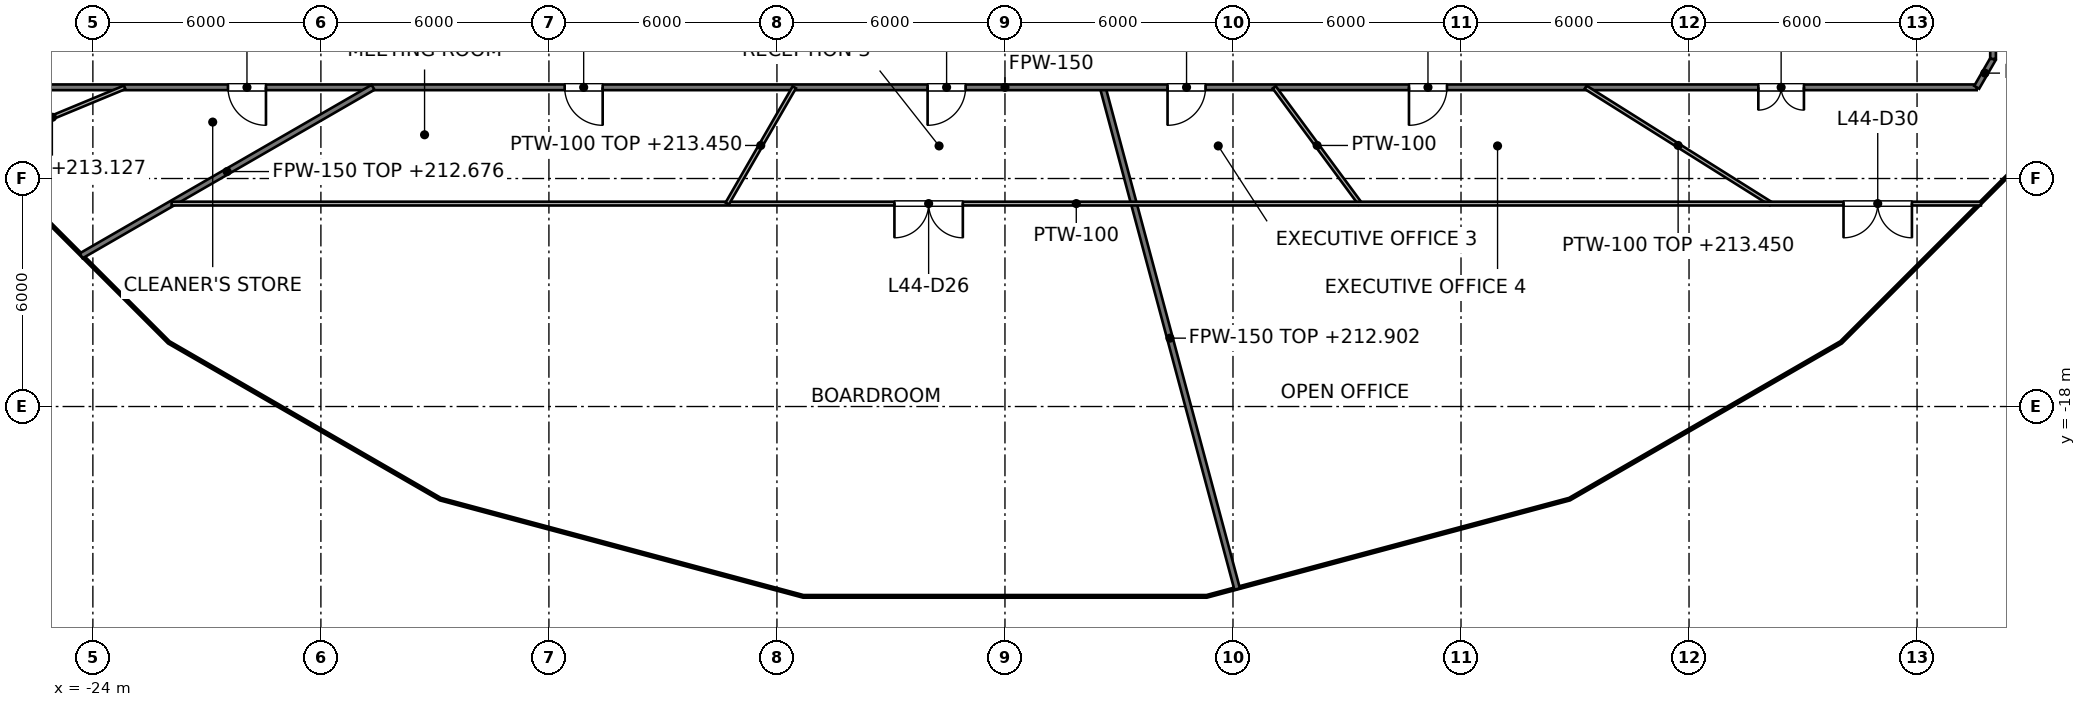
"""IFC4 building model, lengths in metres.
Left out: names, types, materials, properties, quantities, classifications, styles, units other than length and angle.
Written with IfcOpenShell. Run it as: python <this file> out.ifc"""

import sys

from ifc_helpers import new_model, si_unit, direction, frame, frame_2d, origin, place, context, subcontext, project, spatial, rectangle, extrude, element, fill, save


model = new_model("IFC4")
c1 = context("Model", 3, precision=1e-05, world=origin(), true_north=direction((0.0, 1.0)))
c2 = subcontext(c1, "Body", "Model", "MODEL_VIEW")
j1 = project(units=[si_unit("LENGTHUNIT", "METRE"), si_unit("PLANEANGLEUNIT", "RADIAN")], contexts=[c1])
p1 = place(None, origin())
s1 = spatial("IfcSite", under=j1, at=p1, CompositionType="ELEMENT")
p2 = place(p1, origin())
s2 = spatial("IfcBuilding", under=s1, at=p2, CompositionType="ELEMENT")
p3 = place(p2, frame((0.0, 0.0, 209.6)))
s3 = spatial("IfcBuildingStorey", under=s2, at=p3, CompositionType="ELEMENT", Elevation=209.6)
p4 = place(p3, frame((2.572, -9.6, 0.0), z_axis=(0.0, 0.0, 1.0), x_axis=(0.258846500895, -0.965918469113, 0.0)))
e1 = element("IfcWall", 1, at=p4, inside=s3, PredefinedType="PARTITIONING", context=c2, shape_type="SweptSolid", body=[
    extrude(rectangle(XDim=13.668, YDim=0.15, at=frame_2d((6.834, 0.0))), origin(), (0.0, 0.0, 1.0), 3.302),
])
p5 = place(p3, frame((-25.569, -9.6, 0.0), z_axis=(0.0, 0.0, 1.0), x_axis=(1.0, 0.0, 0.0)))
e2 = element("IfcWall", 2, at=p5, inside=s3, PredefinedType="PARTITIONING", context=c2, shape_type="SweptSolid", body=[
    extrude(rectangle(XDim=51.138, YDim=0.15, at=frame_2d((25.569, 0.0))), origin(), (0.0, 0.0, 1.0), 2.918),
])
p6 = place(p5, frame((5.124, 0.0, 0.0)))
e3 = element("IfcOpeningElement", 3, at=p6, cuts=e2, PredefinedType="OPENING", context=c2, shape_type="SweptSolid", body=[
    extrude(rectangle(XDim=1.0, YDim=2.1, at=frame_2d((0.5, 1.05))), frame((0.0, 0.075, 0.0), z_axis=(0.0, -1.0, 0.0), x_axis=(1.0, 0.0, 0.0)), (0.0, 0.0, 1.0), 0.15),
])
p7 = place(p5, frame((13.983, 0.0, 0.0)))
e4 = element("IfcOpeningElement", 4, at=p7, cuts=e2, PredefinedType="OPENING", context=c2, shape_type="SweptSolid", body=[
    extrude(rectangle(XDim=1.0, YDim=2.1, at=frame_2d((0.5, 1.05))), frame((0.0, 0.075, 0.0), z_axis=(0.0, -1.0, 0.0), x_axis=(1.0, 0.0, 0.0)), (0.0, 0.0, 1.0), 0.15),
])
p8 = place(p5, frame((23.533, 0.0, 0.0)))
e5 = element("IfcOpeningElement", 5, at=p8, cuts=e2, PredefinedType="OPENING", context=c2, shape_type="SweptSolid", body=[
    extrude(rectangle(XDim=1.0, YDim=2.1, at=frame_2d((0.5, 1.05))), frame((0.0, 0.075, 0.0), z_axis=(0.0, -1.0, 0.0), x_axis=(1.0, 0.0, 0.0)), (0.0, 0.0, 1.0), 0.15),
])
p9 = place(p5, frame((29.847, 0.0, 0.0)))
e6 = element("IfcOpeningElement", 6, at=p9, cuts=e2, PredefinedType="OPENING", context=c2, shape_type="SweptSolid", body=[
    extrude(rectangle(XDim=1.0, YDim=2.1, at=frame_2d((0.5, 1.05))), frame((0.0, 0.075, 0.0), z_axis=(0.0, -1.0, 0.0), x_axis=(1.0, 0.0, 0.0)), (0.0, 0.0, 1.0), 0.15),
])
p10 = place(p5, frame((36.2, 0.0, 0.0)))
e7 = element("IfcOpeningElement", 7, at=p10, cuts=e2, PredefinedType="OPENING", context=c2, shape_type="SweptSolid", body=[
    extrude(rectangle(XDim=1.0, YDim=2.1, at=frame_2d((0.5, 1.05))), frame((0.0, 0.075, 0.0), z_axis=(0.0, -1.0, 0.0), x_axis=(1.0, 0.0, 0.0)), (0.0, 0.0, 1.0), 0.15),
])
p11 = place(p5, frame((45.393, 0.0, 0.0)))
e8 = element("IfcOpeningElement", 8, at=p11, cuts=e2, PredefinedType="OPENING", context=c2, shape_type="SweptSolid", body=[
    extrude(rectangle(XDim=1.2, YDim=2.1, at=frame_2d((0.6, 1.05))), frame((0.0, 0.075, 0.0), z_axis=(0.0, -1.0, 0.0), x_axis=(1.0, 0.0, 0.0)), (0.0, 0.0, 1.0), 0.15),
])
p12 = place(p3, frame((-24.308, -14.034, 0.0), z_axis=(0.0, 0.0, 1.0), x_axis=(0.866040718929, 0.499973472454, 0.0)))
e9 = element("IfcWall", 9, at=p12, inside=s3, PredefinedType="PARTITIONING", context=c2, shape_type="SweptSolid", body=[
    extrude(rectangle(XDim=8.868, YDim=0.15, at=frame_2d((4.434, 0.0))), origin(), (0.0, 0.0, 1.0), 3.076),
])
p13 = place(p3, frame((25.569, -9.6, 0.0), z_axis=(0.0, 0.0, 1.0), x_axis=(0.499640762619, 0.866232710263, 0.0)))
e10 = element("IfcWall", 10, at=p13, inside=s3, PredefinedType="PARTITIONING", context=c2, shape_type="SweptSolid", body=[
    extrude(rectangle(XDim=0.863, YDim=0.15, at=frame_2d((0.431, 0.0))), origin(), (0.0, 0.0, 1.0), 3.85),
])
p14 = place(p3, frame((26.0, -8.853, 0.0), z_axis=(0.0, 0.0, 1.0), x_axis=(0.0, 1.0, 0.0)))
e11 = element("IfcWall", 11, at=p14, inside=s3, PredefinedType="PARTITIONING", context=c2, shape_type="SweptSolid", body=[
    extrude(rectangle(XDim=2.053, YDim=0.15, at=frame_2d((1.026, 0.0))), origin(), (0.0, 0.0, 1.0), 2.927),
])
p15 = place(p3, frame((7.085, -9.6, 0.0), z_axis=(0.0, 0.0, 1.0), x_axis=(0.593787976906, -0.80462154985, 0.0)))
e12 = element("IfcWall", 12, at=p15, inside=s3, PredefinedType="PARTITIONING", context=c2, shape_type="SweptSolid", body=[
    extrude(rectangle(XDim=3.803, YDim=0.1, at=frame_2d((1.901, 0.0))), origin(), (0.0, 0.0, 1.0), 2.918),
])
p16 = place(p3, frame((15.278, -9.6, 0.0), z_axis=(0.0, 0.0, 1.0), x_axis=(0.84673434941, -0.532015922252, 0.0)))
e13 = element("IfcWall", 13, at=p16, inside=s3, PredefinedType="PARTITIONING", context=c2, shape_type="SweptSolid", body=[
    extrude(rectangle(XDim=5.751, YDim=0.1, at=frame_2d((2.876, 0.0))), origin(), (0.0, 0.0, 1.0), 3.85),
])
p17 = place(p3, frame((-21.928, -12.66, 0.0), z_axis=(0.0, 0.0, 1.0), x_axis=(1.0, 0.0, 0.0)))
e14 = element("IfcWall", 14, at=p17, inside=s3, PredefinedType="PARTITIONING", context=c2, shape_type="SweptSolid", body=[
    extrude(rectangle(XDim=47.609, YDim=0.1, at=frame_2d((23.804, 0.0))), origin(), (0.0, 0.0, 1.0), 2.918),
])
p18 = place(p17, frame((19.02, 0.0, 0.0)))
e15 = element("IfcOpeningElement", 15, at=p18, cuts=e14, PredefinedType="OPENING", context=c2, shape_type="SweptSolid", body=[
    extrude(rectangle(XDim=1.8, YDim=2.1, at=frame_2d((0.9, 1.05))), frame((0.0, 0.05, 0.0), z_axis=(0.0, -1.0, 0.0), x_axis=(1.0, 0.0, 0.0)), (0.0, 0.0, 1.0), 0.1),
])
p19 = place(p17, frame((43.993, 0.0, 0.0)))
e16 = element("IfcOpeningElement", 16, at=p19, cuts=e14, PredefinedType="OPENING", context=c2, shape_type="SweptSolid", body=[
    extrude(rectangle(XDim=1.8, YDim=2.1, at=frame_2d((0.9, 1.05))), frame((0.0, 0.05, 0.0), z_axis=(0.0, -1.0, 0.0), x_axis=(1.0, 0.0, 0.0)), (0.0, 0.0, 1.0), 0.1),
])
p20 = place(p3, frame((-26.967, -11.177, 0.0), z_axis=(0.0, 0.0, 1.0), x_axis=(0.923806551169, 0.382859577414, 0.0)))
e17 = element("IfcWall", 17, at=p20, inside=s3, PredefinedType="PARTITIONING", context=c2, shape_type="SweptSolid", body=[
    extrude(rectangle(XDim=4.119, YDim=0.1, at=frame_2d((2.059, 0.0))), origin(), (0.0, 0.0, 1.0), 3.527),
])
p21 = place(p3, frame((-7.309, -12.66, 0.0), z_axis=(0.0, 0.0, 1.0), x_axis=(0.499899920428, 0.866083177042, 0.0)))
e18 = element("IfcWall", 18, at=p21, inside=s3, PredefinedType="PARTITIONING", context=c2, shape_type="SweptSolid", body=[
    extrude(rectangle(XDim=3.533, YDim=0.1, at=frame_2d((1.767, 0.0))), origin(), (0.0, 0.0, 1.0), 3.85),
])
p22 = place(p6, origin())
e19 = element("IfcDoor", 19, at=p22, inside=s3, OperationType="SINGLE_SWING_RIGHT", PredefinedType="DOOR", context=c2, shape_type="SweptSolid", body=[
    extrude(rectangle(XDim=1.0, YDim=2.1, at=frame_2d((0.5, 1.05))), frame((0.0, 0.025, 0.0), z_axis=(0.0, -1.0, 0.0), x_axis=(1.0, 0.0, 0.0)), (0.0, 0.0, 1.0), 0.05),
])
fill(e3, e19)
p23 = place(p7, origin())
e20 = element("IfcDoor", 20, at=p23, inside=s3, OperationType="SINGLE_SWING_RIGHT", PredefinedType="DOOR", context=c2, shape_type="SweptSolid", body=[
    extrude(rectangle(XDim=1.0, YDim=2.1, at=frame_2d((0.5, 1.05))), frame((0.0, 0.025, 0.0), z_axis=(0.0, -1.0, 0.0), x_axis=(1.0, 0.0, 0.0)), (0.0, 0.0, 1.0), 0.05),
])
fill(e4, e20)
p24 = place(p8, origin())
e21 = element("IfcDoor", 21, at=p24, inside=s3, OperationType="SINGLE_SWING_LEFT", PredefinedType="DOOR", context=c2, shape_type="SweptSolid", body=[
    extrude(rectangle(XDim=1.0, YDim=2.1, at=frame_2d((0.5, 1.05))), frame((0.0, 0.025, 0.0), z_axis=(0.0, -1.0, 0.0), x_axis=(1.0, 0.0, 0.0)), (0.0, 0.0, 1.0), 0.05),
])
fill(e5, e21)
p25 = place(p18, origin())
e22 = element("IfcDoor", 22, at=p25, inside=s3, OperationType="DOUBLE_DOOR_SINGLE_SWING", PredefinedType="DOOR", context=c2, shape_type="SweptSolid", body=[
    extrude(rectangle(XDim=1.8, YDim=2.1, at=frame_2d((0.9, 1.05))), frame((0.0, 0.025, 0.0), z_axis=(0.0, -1.0, 0.0), x_axis=(1.0, 0.0, 0.0)), (0.0, 0.0, 1.0), 0.05),
])
fill(e15, e22)
p26 = place(p9, origin())
e23 = element("IfcDoor", 23, at=p26, inside=s3, OperationType="SINGLE_SWING_LEFT", PredefinedType="DOOR", context=c2, shape_type="SweptSolid", body=[
    extrude(rectangle(XDim=1.0, YDim=2.1, at=frame_2d((0.5, 1.05))), frame((0.0, 0.025, 0.0), z_axis=(0.0, -1.0, 0.0), x_axis=(1.0, 0.0, 0.0)), (0.0, 0.0, 1.0), 0.05),
])
fill(e6, e23)
p27 = place(p10, origin())
e24 = element("IfcDoor", 24, at=p27, inside=s3, OperationType="SINGLE_SWING_LEFT", PredefinedType="DOOR", context=c2, shape_type="SweptSolid", body=[
    extrude(rectangle(XDim=1.0, YDim=2.1, at=frame_2d((0.5, 1.05))), frame((0.0, 0.025, 0.0), z_axis=(0.0, -1.0, 0.0), x_axis=(1.0, 0.0, 0.0)), (0.0, 0.0, 1.0), 0.05),
])
fill(e7, e24)
p28 = place(p11, origin())
e25 = element("IfcDoor", 25, at=p28, inside=s3, OperationType="DOUBLE_DOOR_SINGLE_SWING", PredefinedType="DOOR", context=c2, shape_type="SweptSolid", body=[
    extrude(rectangle(XDim=1.2, YDim=2.1, at=frame_2d((0.6, 1.05))), frame((0.0, 0.025, 0.0), z_axis=(0.0, -1.0, 0.0), x_axis=(1.0, 0.0, 0.0)), (0.0, 0.0, 1.0), 0.05),
])
fill(e8, e25)
p29 = place(p19, origin())
e26 = element("IfcDoor", 26, at=p29, inside=s3, OperationType="DOUBLE_DOOR_SINGLE_SWING", PredefinedType="DOOR", context=c2, shape_type="SweptSolid", body=[
    extrude(rectangle(XDim=1.8, YDim=2.1, at=frame_2d((0.9, 1.05))), frame((0.0, 0.025, 0.0), z_axis=(0.0, -1.0, 0.0), x_axis=(1.0, 0.0, 0.0)), (0.0, 0.0, 1.0), 0.05),
])
fill(e16, e26)
save(model, sys.argv[1])
